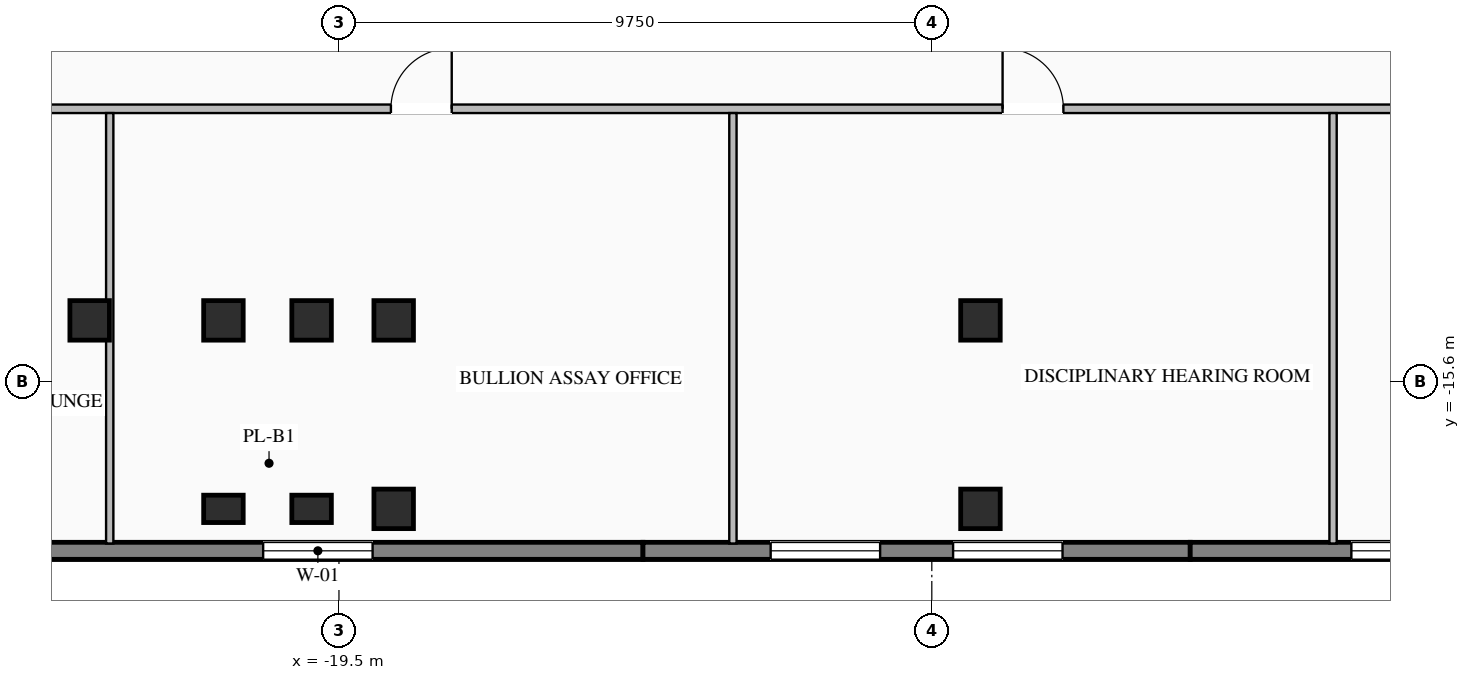
"""IFC4 building model, lengths in metres.
Left out: names, types, materials, properties, quantities, classifications, styles, units other than length and angle.
Written with IfcOpenShell. Run it as: python <this file> out.ifc"""

import sys

from ifc_helpers import new_model, si_unit, direction, frame, frame_2d, origin, origin_2d, place, context, subcontext, project, spatial, rectangle, i_section, extrude, element, fill, save


model = new_model("IFC4")
c1 = context("Model", 3, precision=1e-05, world=origin(), true_north=direction((0.0, 1.0)))
c2 = subcontext(c1, "Body", "Model", "MODEL_VIEW")
j1 = project(units=[si_unit("LENGTHUNIT", "METRE"), si_unit("PLANEANGLEUNIT", "RADIAN")], contexts=[c1])
p1 = place(None, origin())
s1 = spatial("IfcSite", under=j1, at=p1, CompositionType="ELEMENT")
p2 = place(p1, origin())
s2 = spatial("IfcBuilding", under=s1, at=p2, CompositionType="ELEMENT")
p3 = place(p2, frame((0.0, 0.0, 131.2)))
s3 = spatial("IfcBuildingStorey", under=s2, at=p3, CompositionType="ELEMENT", Elevation=131.2)
for number, where, z_axis, x_axis in (
    (1, (-21.4, -14.6, 0.0), (0.0, 0.0, 1.0), (1.0, 0.0, 0.0)),
    (2, (-19.95, -14.6, 0.0), (0.0, 0.0, 1.0), (1.0, 0.0, 0.0)),
    (3, (-18.6, -14.6, 0.0), (0.0, 0.0, 1.0), (1.0, 0.0, 0.0)),
    (4, (-8.95, -14.6, 0.0), (0.0, 0.0, 1.0), (1.0, 0.0, 0.0)),
    (5, (-23.6, -14.6, 0.0), (0.0, 0.0, 1.0), (1.0, 0.0, 0.0)),
    (6, (-18.6, -17.7, 0.0), (0.0, 0.0, 1.0), (1.0, 0.0, 0.0)),
    (7, (-8.95, -17.7, 0.0), (0.0, 0.0, 1.0), (1.0, 0.0, 0.0)),
):
    element("IfcColumn", number, at=place(p3, frame(where, z_axis=z_axis, x_axis=x_axis)), inside=s3, PredefinedType="COLUMN", context=c2, shape_type="SweptSolid", body=[
        extrude(i_section(OverallWidth=0.65, OverallDepth=0.65, WebThickness=0.028, FlangeThickness=0.04, at=origin_2d()), origin(), (0.0, 0.0, 1.0), 3.45),
    ])
for number, where, z_axis, x_axis in (
    (8, (-21.4, -17.7, 0.0), (0.0, 0.0, 1.0), (1.0, 0.0, 0.0)),
    (9, (-19.95, -17.7, 0.0), (0.0, 0.0, 1.0), (1.0, 0.0, 0.0)),
):
    element("IfcColumn", number, at=place(p3, frame(where, z_axis=z_axis, x_axis=x_axis)), inside=s3, PredefinedType="PILASTER", context=c2, shape_type="SweptSolid", body=[
        extrude(rectangle(XDim=0.65, YDim=0.45, at=origin_2d()), origin(), (0.0, 0.0, 1.0), 3.45),
    ])
p4 = place(p3, frame((-14.5, -18.39, 0.0), z_axis=(0.0, 0.0, 1.0), x_axis=(-1.0, 0.0, 0.0)))
e10 = element("IfcWall", 10, at=p4, inside=s3, PredefinedType="STANDARD", context=c2, shape_type="SweptSolid", body=[
    extrude(rectangle(XDim=16.04, YDim=0.28, at=frame_2d((8.02, 0.0))), origin(), (0.0, 0.0, 1.0), 3.25),
])
p5 = place(p4, frame((4.447, 0.0, 0.76)))
e11 = element("IfcOpeningElement", 11, at=p5, cuts=e10, PredefinedType="OPENING", context=c2, shape_type="SweptSolid", body=[
    extrude(rectangle(XDim=1.8, YDim=1.95, at=frame_2d((0.9, 0.975))), frame((0.0, 0.15, 0.0), z_axis=(0.0, -1.0, 0.0), x_axis=(1.0, 0.0, 0.0)), (0.0, 0.0, 1.0), 0.3),
])
p6 = place(p4, frame((9.793, 0.0, 0.76)))
e12 = element("IfcOpeningElement", 12, at=p6, cuts=e10, PredefinedType="OPENING", context=c2, shape_type="SweptSolid", body=[
    extrude(rectangle(XDim=1.8, YDim=1.95, at=frame_2d((0.9, 0.975))), frame((0.0, 0.15, 0.0), z_axis=(0.0, -1.0, 0.0), x_axis=(1.0, 0.0, 0.0)), (0.0, 0.0, 1.0), 0.3),
])
p7 = place(p3, frame((-5.5, -18.39, 0.0), z_axis=(0.0, 0.0, 1.0), x_axis=(-1.0, 0.0, 0.0)))
e13 = element("IfcWall", 13, at=p7, inside=s3, PredefinedType="STANDARD", context=c2, shape_type="SweptSolid", body=[
    extrude(rectangle(XDim=9.0, YDim=0.28, at=frame_2d((4.5, 0.0))), origin(), (0.0, 0.0, 1.0), 3.25),
])
p8 = place(p7, frame((2.1, 0.0, 0.76)))
e14 = element("IfcOpeningElement", 14, at=p8, cuts=e13, PredefinedType="OPENING", context=c2, shape_type="SweptSolid", body=[
    extrude(rectangle(XDim=1.8, YDim=1.95, at=frame_2d((0.9, 0.975))), frame((0.0, 0.15, 0.0), z_axis=(0.0, -1.0, 0.0), x_axis=(1.0, 0.0, 0.0)), (0.0, 0.0, 1.0), 0.3),
])
p9 = place(p7, frame((5.1, 0.0, 0.76)))
e15 = element("IfcOpeningElement", 15, at=p9, cuts=e13, PredefinedType="OPENING", context=c2, shape_type="SweptSolid", body=[
    extrude(rectangle(XDim=1.8, YDim=1.95, at=frame_2d((0.9, 0.975))), frame((0.0, 0.15, 0.0), z_axis=(0.0, -1.0, 0.0), x_axis=(1.0, 0.0, 0.0)), (0.0, 0.0, 1.0), 0.3),
])
p10 = place(p3, frame((3.5, -18.39, 0.0), z_axis=(0.0, 0.0, 1.0), x_axis=(-1.0, 0.0, 0.0)))
e16 = element("IfcWall", 16, at=p10, inside=s3, PredefinedType="STANDARD", context=c2, shape_type="SweptSolid", body=[
    extrude(rectangle(XDim=9.0, YDim=0.28, at=frame_2d((4.5, 0.0))), origin(), (0.0, 0.0, 1.0), 3.25),
])
p11 = place(p10, frame((2.1, 0.0, 0.76)))
e17 = element("IfcOpeningElement", 17, at=p11, cuts=e16, PredefinedType="OPENING", context=c2, shape_type="SweptSolid", body=[
    extrude(rectangle(XDim=1.8, YDim=1.95, at=frame_2d((0.9, 0.975))), frame((0.0, 0.15, 0.0), z_axis=(0.0, -1.0, 0.0), x_axis=(1.0, 0.0, 0.0)), (0.0, 0.0, 1.0), 0.3),
])
p12 = place(p10, frame((4.55, 0.0, 0.76)))
e18 = element("IfcOpeningElement", 18, at=p12, cuts=e16, PredefinedType="OPENING", context=c2, shape_type="SweptSolid", body=[
    extrude(rectangle(XDim=1.8, YDim=1.95, at=frame_2d((0.9, 0.975))), frame((0.0, 0.15, 0.0), z_axis=(0.0, -1.0, 0.0), x_axis=(1.0, 0.0, 0.0)), (0.0, 0.0, 1.0), 0.3),
])
p13 = place(p3, frame((-32.82, -11.12, 0.0), z_axis=(0.0, 0.0, 1.0), x_axis=(1.0, 0.0, 0.0)))
e19 = element("IfcWall", 19, at=p13, inside=s3, PredefinedType="STANDARD", context=c2, shape_type="SweptSolid", body=[
    extrude(rectangle(XDim=63.64, YDim=0.14, at=frame_2d((31.82, 0.0))), origin(), (0.0, 0.0, 1.0), 3.25),
])
p14 = place(p13, frame((39.31, 0.0, 0.0)))
e20 = element("IfcOpeningElement", 20, at=p14, cuts=e19, PredefinedType="OPENING", context=c2, shape_type="SweptSolid", body=[
    extrude(rectangle(XDim=0.92, YDim=2.08, at=frame_2d((0.46, 1.04))), frame((0.0, 0.08, 0.0), z_axis=(0.0, -1.0, 0.0), x_axis=(1.0, 0.0, 0.0)), (0.0, 0.0, 1.0), 0.16),
])
p15 = place(p13, frame((42.81, 0.0, 0.0)))
e21 = element("IfcOpeningElement", 21, at=p15, cuts=e19, PredefinedType="OPENING", context=c2, shape_type="SweptSolid", body=[
    extrude(rectangle(XDim=0.92, YDim=2.08, at=frame_2d((0.46, 1.04))), frame((0.0, 0.08, 0.0), z_axis=(0.0, -1.0, 0.0), x_axis=(1.0, 0.0, 0.0)), (0.0, 0.0, 1.0), 0.16),
])
p16 = place(p13, frame((45.66, 0.0, 0.0)))
e22 = element("IfcOpeningElement", 22, at=p16, cuts=e19, PredefinedType="OPENING", context=c2, shape_type="SweptSolid", body=[
    extrude(rectangle(XDim=0.92, YDim=2.08, at=frame_2d((0.46, 1.04))), frame((0.0, 0.08, 0.0), z_axis=(0.0, -1.0, 0.0), x_axis=(1.0, 0.0, 0.0)), (0.0, 0.0, 1.0), 0.16),
])
p17 = place(p13, frame((4.401, 0.0, 0.0)))
e23 = element("IfcOpeningElement", 23, at=p17, cuts=e19, PredefinedType="OPENING", context=c2, shape_type="SweptSolid", body=[
    extrude(rectangle(XDim=1.0, YDim=2.08, at=frame_2d((0.5, 1.04))), frame((0.0, 0.08, 0.0), z_axis=(0.0, -1.0, 0.0), x_axis=(1.0, 0.0, 0.0)), (0.0, 0.0, 1.0), 0.16),
])
p18 = place(p13, frame((14.175, 0.0, 0.0)))
e24 = element("IfcOpeningElement", 24, at=p18, cuts=e19, PredefinedType="OPENING", context=c2, shape_type="SweptSolid", body=[
    extrude(rectangle(XDim=1.0, YDim=2.08, at=frame_2d((0.5, 1.04))), frame((0.0, 0.08, 0.0), z_axis=(0.0, -1.0, 0.0), x_axis=(1.0, 0.0, 0.0)), (0.0, 0.0, 1.0), 0.16),
])
p19 = place(p13, frame((24.234, 0.0, 0.0)))
e25 = element("IfcOpeningElement", 25, at=p19, cuts=e19, PredefinedType="OPENING", context=c2, shape_type="SweptSolid", body=[
    extrude(rectangle(XDim=1.0, YDim=2.08, at=frame_2d((0.5, 1.04))), frame((0.0, 0.08, 0.0), z_axis=(0.0, -1.0, 0.0), x_axis=(1.0, 0.0, 0.0)), (0.0, 0.0, 1.0), 0.16),
])
p20 = place(p13, frame((33.344, 0.0, 0.0)))
e26 = element("IfcOpeningElement", 26, at=p20, cuts=e19, PredefinedType="OPENING", context=c2, shape_type="SweptSolid", body=[
    extrude(rectangle(XDim=1.0, YDim=2.08, at=frame_2d((0.5, 1.04))), frame((0.0, 0.08, 0.0), z_axis=(0.0, -1.0, 0.0), x_axis=(1.0, 0.0, 0.0)), (0.0, 0.0, 1.0), 0.16),
])
p21 = place(p13, frame((48.765, 0.0, 0.0)))
e27 = element("IfcOpeningElement", 27, at=p21, cuts=e19, PredefinedType="OPENING", context=c2, shape_type="SweptSolid", body=[
    extrude(rectangle(XDim=1.0, YDim=2.08, at=frame_2d((0.5, 1.04))), frame((0.0, 0.08, 0.0), z_axis=(0.0, -1.0, 0.0), x_axis=(1.0, 0.0, 0.0)), (0.0, 0.0, 1.0), 0.16),
])
p22 = place(p13, frame((53.019, 0.0, 0.0)))
e28 = element("IfcOpeningElement", 28, at=p22, cuts=e19, PredefinedType="OPENING", context=c2, shape_type="SweptSolid", body=[
    extrude(rectangle(XDim=1.0, YDim=2.08, at=frame_2d((0.5, 1.04))), frame((0.0, 0.08, 0.0), z_axis=(0.0, -1.0, 0.0), x_axis=(1.0, 0.0, 0.0)), (0.0, 0.0, 1.0), 0.16),
])
p23 = place(p13, frame((57.354, 0.0, 0.0)))
e29 = element("IfcOpeningElement", 29, at=p23, cuts=e19, PredefinedType="OPENING", context=c2, shape_type="SweptSolid", body=[
    extrude(rectangle(XDim=1.0, YDim=2.08, at=frame_2d((0.5, 1.04))), frame((0.0, 0.08, 0.0), z_axis=(0.0, -1.0, 0.0), x_axis=(1.0, 0.0, 0.0)), (0.0, 0.0, 1.0), 0.16),
])
p24 = place(p13, frame((61.185, 0.0, 0.0)))
e30 = element("IfcOpeningElement", 30, at=p24, cuts=e19, PredefinedType="OPENING", context=c2, shape_type="SweptSolid", body=[
    extrude(rectangle(XDim=1.0, YDim=2.08, at=frame_2d((0.5, 1.04))), frame((0.0, 0.08, 0.0), z_axis=(0.0, -1.0, 0.0), x_axis=(1.0, 0.0, 0.0)), (0.0, 0.0, 1.0), 0.16),
])
for number, where, z_axis, x_axis in (
    (31, (-23.27, -18.27, 0.0), (0.0, 0.0, 1.0), (0.0, 1.0, 0.0)),
    (32, (-13.021, -18.27, 0.0), (0.0, 0.0, 1.0), (0.0, 1.0, 0.0)),
    (33, (-3.151, -18.27, 0.0), (0.0, 0.0, 1.0), (0.0, 1.0, 0.0)),
):
    element("IfcWall", number, at=place(p3, frame(where, z_axis=z_axis, x_axis=x_axis)), inside=s3, PredefinedType="STANDARD", context=c2, shape_type="SweptSolid", body=[
        extrude(rectangle(XDim=7.08, YDim=0.12, at=frame_2d((3.54, 0.0))), origin(), (0.0, 0.0, 1.0), 3.25),
    ])
p25 = place(p5, origin())
e34 = element("IfcWindow", 34, at=p25, inside=s3, PartitioningType="SINGLE_PANEL", PredefinedType="WINDOW", context=c2, shape_type="SweptSolid", body=[
    extrude(rectangle(XDim=1.8, YDim=1.95, at=frame_2d((0.9, 0.975))), frame((0.0, 0.03, 0.0), z_axis=(0.0, -1.0, 0.0), x_axis=(1.0, 0.0, 0.0)), (0.0, 0.0, 1.0), 0.06),
])
fill(e11, e34)
p26 = place(p8, origin())
e35 = element("IfcWindow", 35, at=p26, inside=s3, PartitioningType="SINGLE_PANEL", PredefinedType="WINDOW", context=c2, shape_type="SweptSolid", body=[
    extrude(rectangle(XDim=1.8, YDim=1.95, at=frame_2d((0.9, 0.975))), frame((0.0, 0.03, 0.0), z_axis=(0.0, -1.0, 0.0), x_axis=(1.0, 0.0, 0.0)), (0.0, 0.0, 1.0), 0.06),
])
fill(e14, e35)
p27 = place(p9, origin())
e36 = element("IfcWindow", 36, at=p27, inside=s3, PartitioningType="SINGLE_PANEL", PredefinedType="WINDOW", context=c2, shape_type="SweptSolid", body=[
    extrude(rectangle(XDim=1.8, YDim=1.95, at=frame_2d((0.9, 0.975))), frame((0.0, 0.03, 0.0), z_axis=(0.0, -1.0, 0.0), x_axis=(1.0, 0.0, 0.0)), (0.0, 0.0, 1.0), 0.06),
])
fill(e15, e36)
p28 = place(p12, origin())
e37 = element("IfcWindow", 37, at=p28, inside=s3, PartitioningType="SINGLE_PANEL", PredefinedType="WINDOW", context=c2, shape_type="SweptSolid", body=[
    extrude(rectangle(XDim=1.8, YDim=1.95, at=frame_2d((0.9, 0.975))), frame((0.0, 0.03, 0.0), z_axis=(0.0, -1.0, 0.0), x_axis=(1.0, 0.0, 0.0)), (0.0, 0.0, 1.0), 0.06),
])
fill(e18, e37)
p29 = place(p18, origin())
e38 = element("IfcDoor", 38, at=p29, inside=s3, OperationType="SINGLE_SWING_RIGHT", PredefinedType="DOOR", context=c2, shape_type="SweptSolid", body=[
    extrude(rectangle(XDim=1.0, YDim=2.08, at=frame_2d((0.5, 1.04))), frame((0.0, 0.025, 0.0), z_axis=(0.0, -1.0, 0.0), x_axis=(1.0, 0.0, 0.0)), (0.0, 0.0, 1.0), 0.05),
])
fill(e24, e38)
p30 = place(p19, origin())
e39 = element("IfcDoor", 39, at=p30, inside=s3, OperationType="SINGLE_SWING_LEFT", PredefinedType="DOOR", context=c2, shape_type="SweptSolid", body=[
    extrude(rectangle(XDim=1.0, YDim=2.08, at=frame_2d((0.5, 1.04))), frame((0.0, 0.025, 0.0), z_axis=(0.0, -1.0, 0.0), x_axis=(1.0, 0.0, 0.0)), (0.0, 0.0, 1.0), 0.05),
])
fill(e25, e39)
save(model, sys.argv[1])
